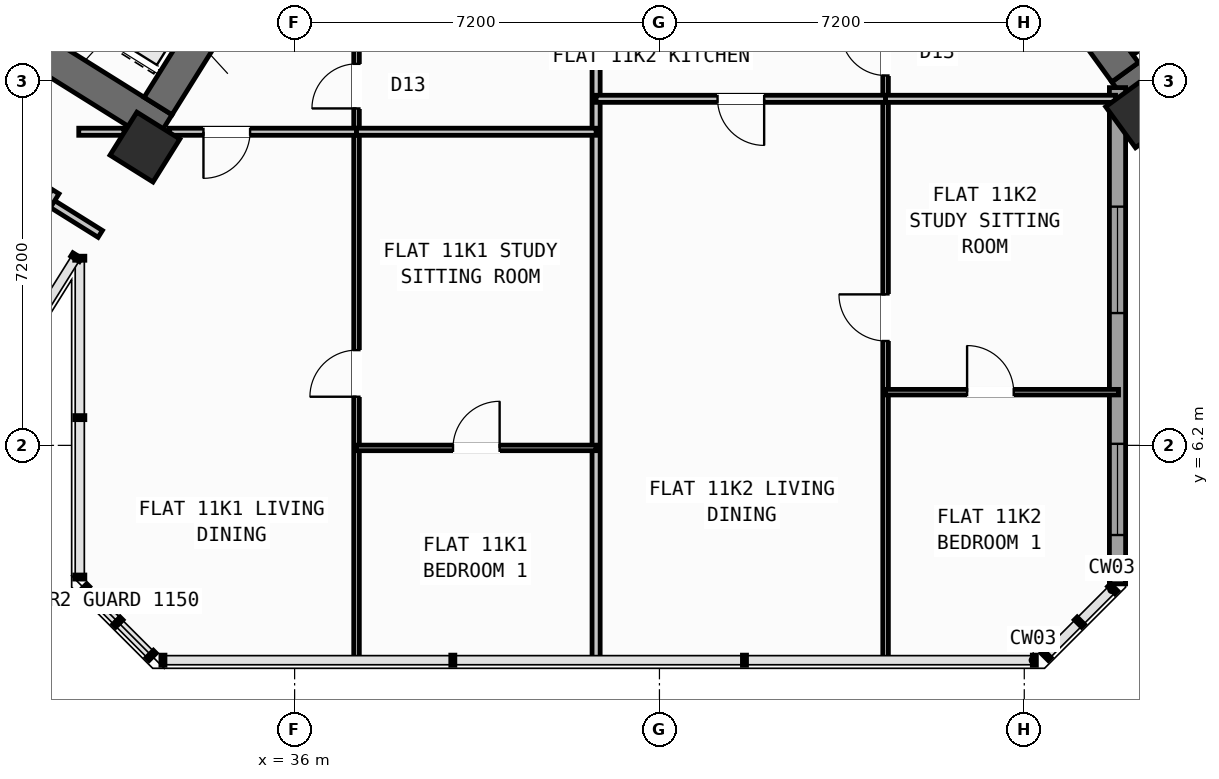
"""IFC4 building model, lengths in metres.
Left out: names, types, materials, properties, quantities, classifications, styles, units other than length and angle.
Written with IfcOpenShell. Run it as: python <this file> out.ifc"""

import sys

from ifc_helpers import new_model, si_unit, direction, frame, frame_2d, origin, origin_2d, place, context, subcontext, project, spatial, rectangle, hollow_rectangle, extrude, source, transform, mapped, element, fill, save


model = new_model("IFC4")
c1 = context("Model", 3, precision=1e-05, world=origin(), true_north=direction((0.0, 1.0)))
c2 = subcontext(c1, "Body", "Model", "MODEL_VIEW")
j1 = project(units=[si_unit("LENGTHUNIT", "METRE"), si_unit("PLANEANGLEUNIT", "RADIAN")], contexts=[c1])
p1 = place(None, origin())
s1 = spatial("IfcSite", under=j1, at=p1, CompositionType="ELEMENT")
p2 = place(p1, origin())
s2 = spatial("IfcBuilding", under=s1, at=p2, CompositionType="ELEMENT")
p3 = place(p2, frame((0.0, 0.0, 45.6)))
s3 = spatial("IfcBuildingStorey", under=s2, at=p3, CompositionType="ELEMENT", Elevation=45.6)
p4 = place(p3, frame((33.409, 12.45, 0.0), z_axis=(0.0, 0.0, 1.0), x_axis=(-0.848051132073, 0.529914405721, 0.0)))
e1 = element("IfcWall", 1, at=p4, inside=s3, PredefinedType="SHEAR", context=c2, shape_type="SweptSolid", body=[
    extrude(rectangle(XDim=13.24, YDim=0.65, at=frame_2d((6.62, 0.0))), origin(), (0.0, 0.0, 1.0), 3.35),
])
p5 = place(p3, frame((36.683, 18.304, 0.0), z_axis=(0.0, 0.0, 1.0), x_axis=(-0.529899109053, -0.848060690178, 0.0)))
e2 = element("IfcWall", 2, at=p5, inside=s3, PredefinedType="SHEAR", context=c2, shape_type="SweptSolid", body=[
    extrude(rectangle(XDim=6.375, YDim=0.65, at=frame_2d((3.188, 0.0))), origin(), (0.0, 0.0, 1.0), 3.35),
])
p6 = place(p3, frame((52.318, 13.11, 0.0), z_axis=(0.0, 0.0, 1.0), x_axis=(0.809019445368, 0.587781878776, 0.0)))
e3 = element("IfcWall", 3, at=p6, inside=s3, PredefinedType="SHEAR", context=c2, shape_type="SweptSolid", body=[
    extrude(rectangle(XDim=12.44, YDim=0.65, at=frame_2d((6.22, 0.0))), origin(), (0.0, 0.0, 1.0), 3.35),
])
p7 = place(p3, frame((52.39, 13.564, 0.0), z_axis=(0.0, 0.0, 1.0), x_axis=(-0.58779688989, 0.809008539037, 0.0)))
e4 = element("IfcWall", 4, at=p7, inside=s3, PredefinedType="SHEAR", context=c2, shape_type="SweptSolid", body=[
    extrude(rectangle(XDim=3.525, YDim=0.65, at=frame_2d((1.763, 0.0))), origin(), (0.0, 0.0, 1.0), 3.35),
])
m1 = source(origin(), c2, "Body", "SweptSolid", [
    extrude(hollow_rectangle(XDim=1.0, YDim=1.0, WallThickness=0.04, at=origin_2d()), origin(), (0.0, 0.0, 1.0), 3.6),
])
for number, where, z_axis, x_axis in (
    (5, (33.046, 12.087, 0.0), (0.0, 0.0, 1.0), (-0.848, 0.53, 0.0)),
    (6, (52.705, 12.773, 0.0), (0.0, 0.0, 1.0), (0.809, 0.588, 0.0)),
):
    element("IfcColumn", number, at=place(p3, frame(where, z_axis=z_axis, x_axis=x_axis)), inside=s3, PredefinedType="COLUMN", context=c2, shape_type="MappedRepresentation", body=[
        mapped(m1, transform((0.0, 0.0, 0.0), scale=1.0)),
    ])
p8 = place(p3, frame((56.581, 7.439, 0.0), z_axis=(0.0, 0.0, 1.0), x_axis=(-0.587785875463, 0.809016541614, 0.0)))
e7 = element("IfcWall", 7, at=p8, inside=s3, PredefinedType="STANDARD", context=c2, shape_type="SweptSolid", body=[
    extrude(rectangle(XDim=6.774, YDim=0.32, at=frame_2d((3.387, 0.0))), origin(), (0.0, 0.0, 1.0), 2.725),
])
p9 = place(p8, frame((1.556, 0.0, 0.8)))
e8 = element("IfcOpeningElement", 8, at=p9, cuts=e7, PredefinedType="OPENING", context=c2, shape_type="SweptSolid", body=[
    extrude(rectangle(XDim=2.1, YDim=1.55, at=frame_2d((1.05, 0.775))), frame((0.0, 0.17, 0.0), z_axis=(0.0, -1.0, 0.0), x_axis=(1.0, 0.0, 0.0)), (0.0, 0.0, 1.0), 0.34),
])
p10 = place(p3, frame((52.24, 13.261, 0.0), z_axis=(0.0, 0.0, 1.0), x_axis=(0.0, -1.0, 0.0)))
e9 = element("IfcWall", 9, at=p10, inside=s3, PredefinedType="STANDARD", context=c2, shape_type="SweptSolid", body=[
    extrude(rectangle(XDim=9.795, YDim=0.32, at=frame_2d((4.897, 0.0))), origin(), (0.0, 0.0, 1.0), 3.35),
])
p11 = place(p10, frame((2.349, 0.0, 0.8)))
e10 = element("IfcOpeningElement", 10, at=p11, cuts=e9, PredefinedType="OPENING", context=c2, shape_type="SweptSolid", body=[
    extrude(rectangle(XDim=2.1, YDim=1.55, at=frame_2d((1.05, 0.775))), frame((0.0, 0.17, 0.0), z_axis=(0.0, -1.0, 0.0), x_axis=(1.0, 0.0, 0.0)), (0.0, 0.0, 1.0), 0.34),
])
p12 = place(p10, frame((7.03, 0.0, 0.85)))
e11 = element("IfcOpeningElement", 11, at=p12, cuts=e9, PredefinedType="OPENING", context=c2, shape_type="SweptSolid", body=[
    extrude(rectangle(XDim=1.8, YDim=1.5, at=frame_2d((0.9, 0.75))), frame((0.0, 0.17, 0.0), z_axis=(0.0, -1.0, 0.0), x_axis=(1.0, 0.0, 0.0)), (0.0, 0.0, 1.0), 0.34),
])
p13 = place(p3, frame((52.472, 14.013, 0.0), z_axis=(0.0, 0.0, 1.0), x_axis=(0.809028366311, 0.587769599847, 0.0)))
e12 = element("IfcWall", 12, at=p13, inside=s3, PredefinedType="SHEAR", context=c2, shape_type="SweptSolid", body=[
    extrude(rectangle(XDim=7.33, YDim=0.26, at=frame_2d((3.665, 0.0))), origin(), (0.0, 0.0, 1.0), 3.35),
])
p14 = place(p3, frame((32.164, 10.374, 0.0), z_axis=(0.0, 0.0, 1.0), x_axis=(-0.848044107957, 0.529925646633, 0.0)))
e13 = element("IfcWall", 13, at=p14, inside=s3, PredefinedType="PARTITIONING", context=c2, shape_type="SweptSolid", body=[
    extrude(rectangle(XDim=15.57, YDim=0.16, at=frame_2d((7.785, 0.0))), origin(), (0.0, 0.0, 1.0), 3.34),
])
p15 = place(p14, frame((10.83, 0.0, 0.0)))
e14 = element("IfcOpeningElement", 14, at=p15, cuts=e13, PredefinedType="OPENING", context=c2, shape_type="SweptSolid", body=[
    extrude(rectangle(XDim=1.0, YDim=2.1, at=frame_2d((0.5, 1.05))), frame((0.0, 0.09, 0.0), z_axis=(0.0, -1.0, 0.0), x_axis=(1.0, 0.0, 0.0)), (0.0, 0.0, 1.0), 0.18),
])
p16 = place(p3, frame((31.282, 11.208, 0.0), z_axis=(0.0, 0.0, 1.0), x_axis=(-0.529938869374, -0.84803584519, 0.0)))
e15 = element("IfcWall", 15, at=p16, inside=s3, PredefinedType="PARTITIONING", context=c2, shape_type="SweptSolid", body=[
    extrude(rectangle(XDim=5.48, YDim=0.16, at=frame_2d((2.74, 0.0))), origin(), (0.0, 0.0, 1.0), 3.34),
])
p17 = place(p3, frame((41.95, 1.96, 0.0), z_axis=(0.0, 0.0, 1.0), x_axis=(0.0, 1.0, 0.0)))
e16 = element("IfcWall", 16, at=p17, inside=s3, PredefinedType="PARTITIONING", context=c2, shape_type="SweptSolid", body=[
    extrude(rectangle(XDim=13.46, YDim=0.16, at=frame_2d((6.73, 0.0))), origin(), (0.0, 0.0, 1.0), 3.34),
])
p18 = place(p3, frame((37.222, 1.96, 0.0), z_axis=(0.0, 0.0, 1.0), x_axis=(0.0, 1.0, 0.0)))
e17 = element("IfcWall", 17, at=p18, inside=s3, PredefinedType="PARTITIONING", context=c2, shape_type="SweptSolid", body=[
    extrude(rectangle(XDim=13.46, YDim=0.11, at=frame_2d((6.73, 0.0))), origin(), (0.0, 0.0, 1.0), 3.34),
])
p19 = place(p18, frame((5.2, 0.0, 0.0)))
e18 = element("IfcOpeningElement", 18, at=p19, cuts=e17, PredefinedType="OPENING", context=c2, shape_type="SweptSolid", body=[
    extrude(rectangle(XDim=0.92, YDim=2.08, at=frame_2d((0.46, 1.04))), frame((0.0, 0.065, 0.0), z_axis=(0.0, -1.0, 0.0), x_axis=(1.0, 0.0, 0.0)), (0.0, 0.0, 1.0), 0.13),
])
p20 = place(p18, frame((10.89, 0.0, 0.0)))
e19 = element("IfcOpeningElement", 19, at=p20, cuts=e17, PredefinedType="OPENING", context=c2, shape_type="SweptSolid", body=[
    extrude(rectangle(XDim=0.88, YDim=2.08, at=frame_2d((0.44, 1.04))), frame((0.0, 0.065, 0.0), z_axis=(0.0, -1.0, 0.0), x_axis=(1.0, 0.0, 0.0)), (0.0, 0.0, 1.0), 0.13),
])
p21 = place(p3, frame((31.74, 12.39, 0.0), z_axis=(0.0, 0.0, 1.0), x_axis=(1.0, 0.0, 0.0)))
e20 = element("IfcWall", 20, at=p21, inside=s3, PredefinedType="PLUMBINGWALL", context=c2, shape_type="SweptSolid", body=[
    extrude(rectangle(XDim=0.892, YDim=0.14, at=frame_2d((0.446, 0.0))), origin(), (0.0, 0.0, 1.0), 3.34),
])
p22 = place(p3, frame((33.527, 12.39, 0.0), z_axis=(0.0, 0.0, 1.0), x_axis=(1.0, 0.0, 0.0)))
e21 = element("IfcWall", 21, at=p22, inside=s3, PredefinedType="PLUMBINGWALL", context=c2, shape_type="SweptSolid", body=[
    extrude(rectangle(XDim=3.695, YDim=0.14, at=frame_2d((1.847, 0.0))), origin(), (0.0, 0.0, 1.0), 2.525),
])
p23 = place(p22, frame((0.674, 0.0, 0.0)))
e22 = element("IfcOpeningElement", 22, at=p23, cuts=e21, PredefinedType="OPENING", context=c2, shape_type="SweptSolid", body=[
    extrude(rectangle(XDim=0.92, YDim=2.08, at=frame_2d((0.46, 1.04))), frame((0.0, 0.08, 0.0), z_axis=(0.0, -1.0, 0.0), x_axis=(1.0, 0.0, 0.0)), (0.0, 0.0, 1.0), 0.16),
])
p24 = place(p3, frame((37.222, 12.39, 0.0), z_axis=(0.0, 0.0, 1.0), x_axis=(1.0, 0.0, 0.0)))
e23 = element("IfcWall", 23, at=p24, inside=s3, PredefinedType="PLUMBINGWALL", context=c2, shape_type="SweptSolid", body=[
    extrude(rectangle(XDim=4.728, YDim=0.14, at=frame_2d((2.364, 0.0))), origin(), (0.0, 0.0, 1.0), 2.525),
])
p25 = place(p3, frame((37.222, 6.15, 0.0), z_axis=(0.0, 0.0, 1.0), x_axis=(1.0, 0.0, 0.0)))
e24 = element("IfcWall", 24, at=p25, inside=s3, PredefinedType="PARTITIONING", context=c2, shape_type="SweptSolid", body=[
    extrude(rectangle(XDim=4.728, YDim=0.11, at=frame_2d((2.364, 0.0))), origin(), (0.0, 0.0, 1.0), 3.34),
])
p26 = place(p25, frame((1.904, 0.0, 0.0)))
e25 = element("IfcOpeningElement", 25, at=p26, cuts=e24, PredefinedType="OPENING", context=c2, shape_type="SweptSolid", body=[
    extrude(rectangle(XDim=0.92, YDim=2.08, at=frame_2d((0.46, 1.04))), frame((0.0, 0.065, 0.0), z_axis=(0.0, -1.0, 0.0), x_axis=(1.0, 0.0, 0.0)), (0.0, 0.0, 1.0), 0.13),
])
p27 = place(p3, frame((47.663, 1.96, 0.0), z_axis=(0.0, 0.0, 1.0), x_axis=(0.0, 1.0, 0.0)))
e26 = element("IfcWall", 26, at=p27, inside=s3, PredefinedType="PARTITIONING", context=c2, shape_type="SweptSolid", body=[
    extrude(rectangle(XDim=13.46, YDim=0.11, at=frame_2d((6.73, 0.0))), origin(), (0.0, 0.0, 1.0), 3.34),
])
p28 = place(p27, frame((6.3, 0.0, 0.0)))
e27 = element("IfcOpeningElement", 27, at=p28, cuts=e26, PredefinedType="OPENING", context=c2, shape_type="SweptSolid", body=[
    extrude(rectangle(XDim=0.92, YDim=2.08, at=frame_2d((0.46, 1.04))), frame((0.0, 0.065, 0.0), z_axis=(0.0, -1.0, 0.0), x_axis=(1.0, 0.0, 0.0)), (0.0, 0.0, 1.0), 0.13),
])
p29 = place(p27, frame((11.54, 0.0, 0.0)))
e28 = element("IfcOpeningElement", 28, at=p29, cuts=e26, PredefinedType="OPENING", context=c2, shape_type="SweptSolid", body=[
    extrude(rectangle(XDim=0.88, YDim=2.08, at=frame_2d((0.44, 1.04))), frame((0.0, 0.065, 0.0), z_axis=(0.0, -1.0, 0.0), x_axis=(1.0, 0.0, 0.0)), (0.0, 0.0, 1.0), 0.13),
])
p30 = place(p3, frame((41.95, 13.04, 0.0), z_axis=(0.0, 0.0, 1.0), x_axis=(1.0, 0.0, 0.0)))
e29 = element("IfcWall", 29, at=p30, inside=s3, PredefinedType="PLUMBINGWALL", context=c2, shape_type="SweptSolid", body=[
    extrude(rectangle(XDim=5.713, YDim=0.14, at=frame_2d((2.856, 0.0))), origin(), (0.0, 0.0, 1.0), 3.34),
])
p31 = place(p30, frame((2.396, 0.0, 0.0)))
e30 = element("IfcOpeningElement", 30, at=p31, cuts=e29, PredefinedType="OPENING", context=c2, shape_type="SweptSolid", body=[
    extrude(rectangle(XDim=0.92, YDim=2.08, at=frame_2d((0.46, 1.04))), frame((0.0, 0.08, 0.0), z_axis=(0.0, -1.0, 0.0), x_axis=(1.0, 0.0, 0.0)), (0.0, 0.0, 1.0), 0.16),
])
p32 = place(p3, frame((47.663, 13.04, 0.0), z_axis=(0.0, 0.0, 1.0), x_axis=(1.0, 0.0, 0.0)))
e31 = element("IfcWall", 31, at=p32, inside=s3, PredefinedType="PLUMBINGWALL", context=c2, shape_type="SweptSolid", body=[
    extrude(rectangle(XDim=4.538, YDim=0.14, at=frame_2d((2.269, 0.0))), origin(), (0.0, 0.0, 1.0), 2.525),
])
p33 = place(p3, frame((47.663, 7.25, 0.0), z_axis=(0.0, 0.0, 1.0), x_axis=(1.0, 0.0, 0.0)))
e32 = element("IfcWall", 32, at=p33, inside=s3, PredefinedType="PARTITIONING", context=c2, shape_type="SweptSolid", body=[
    extrude(rectangle(XDim=4.597, YDim=0.11, at=frame_2d((2.298, 0.0))), origin(), (0.0, 0.0, 1.0), 3.34),
])
p34 = place(p33, frame((1.608, 0.0, 0.0)))
e33 = element("IfcOpeningElement", 33, at=p34, cuts=e32, PredefinedType="OPENING", context=c2, shape_type="SweptSolid", body=[
    extrude(rectangle(XDim=0.92, YDim=2.08, at=frame_2d((0.46, 1.04))), frame((0.0, 0.065, 0.0), z_axis=(0.0, -1.0, 0.0), x_axis=(1.0, 0.0, 0.0)), (0.0, 0.0, 1.0), 0.13),
])
m2 = source(origin(), c2, "Body", "SweptSolid", [
    extrude(rectangle(XDim=2.1, YDim=1.55, at=frame_2d((1.05, 0.775))), frame((0.0, 0.03, 0.0), z_axis=(0.0, -1.0, 0.0), x_axis=(1.0, 0.0, 0.0)), (0.0, 0.0, 1.0), 0.06),
])
p35 = place(p11, origin())
e34 = element("IfcWindow", 34, at=p35, inside=s3, PartitioningType="SINGLE_PANEL", PredefinedType="WINDOW", context=c2, shape_type="MappedRepresentation", body=[
    mapped(m2, transform((0.0, 0.0, 0.0), scale=1.0)),
])
fill(e10, e34)
m3 = source(origin(), c2, "Body", "SweptSolid", [
    extrude(rectangle(XDim=1.8, YDim=1.5, at=frame_2d((0.9, 0.75))), frame((0.0, 0.03, 0.0), z_axis=(0.0, -1.0, 0.0), x_axis=(1.0, 0.0, 0.0)), (0.0, 0.0, 1.0), 0.06),
])
p36 = place(p12, origin())
e35 = element("IfcWindow", 35, at=p36, inside=s3, PartitioningType="SINGLE_PANEL", PredefinedType="WINDOW", context=c2, shape_type="MappedRepresentation", body=[
    mapped(m3, transform((0.0, 0.0, 0.0), scale=1.0)),
])
fill(e11, e35)
m4 = source(origin(), c2, "Body", "SweptSolid", [
    extrude(rectangle(XDim=0.92, YDim=2.08, at=frame_2d((0.46, 1.04))), frame((0.0, 0.025, 0.0), z_axis=(0.0, -1.0, 0.0), x_axis=(1.0, 0.0, 0.0)), (0.0, 0.0, 1.0), 0.05),
])
p37 = place(p19, origin())
e36 = element("IfcDoor", 36, at=p37, inside=s3, OperationType="SINGLE_SWING_LEFT", PredefinedType="DOOR", context=c2, shape_type="MappedRepresentation", body=[
    mapped(m4, transform((0.0, 0.0, 0.0), scale=1.0)),
])
fill(e18, e36)
p38 = place(p26, origin())
e37 = element("IfcDoor", 37, at=p38, inside=s3, OperationType="SINGLE_SWING_RIGHT", PredefinedType="DOOR", context=c2, shape_type="MappedRepresentation", body=[
    mapped(m4, transform((0.0, 0.0, 0.0), scale=1.0)),
])
fill(e25, e37)
p39 = place(p23, frame((0.92, 0.0, 0.0), z_axis=(0.0, 0.0, 1.0), x_axis=(-1.0, 0.0, 0.0)))
e38 = element("IfcDoor", 38, at=p39, inside=s3, OperationType="SINGLE_SWING_RIGHT", PredefinedType="DOOR", context=c2, shape_type="MappedRepresentation", body=[
    mapped(m4, transform((0.0, 0.0, 0.0), scale=1.0)),
])
fill(e22, e38)
m5 = source(origin(), c2, "Body", "SweptSolid", [
    extrude(rectangle(XDim=0.88, YDim=2.08, at=frame_2d((0.44, 1.04))), frame((0.0, 0.025, 0.0), z_axis=(0.0, -1.0, 0.0), x_axis=(1.0, 0.0, 0.0)), (0.0, 0.0, 1.0), 0.05),
])
p40 = place(p20, origin())
e39 = element("IfcDoor", 39, at=p40, inside=s3, OperationType="SINGLE_SWING_LEFT", PredefinedType="DOOR", context=c2, shape_type="MappedRepresentation", body=[
    mapped(m5, transform((0.0, 0.0, 0.0), scale=1.0)),
])
fill(e19, e39)
p41 = place(p28, origin())
e40 = element("IfcDoor", 40, at=p41, inside=s3, OperationType="SINGLE_SWING_RIGHT", PredefinedType="DOOR", context=c2, shape_type="MappedRepresentation", body=[
    mapped(m4, transform((0.0, 0.0, 0.0), scale=1.0)),
])
fill(e27, e40)
p42 = place(p34, origin())
e41 = element("IfcDoor", 41, at=p42, inside=s3, OperationType="SINGLE_SWING_LEFT", PredefinedType="DOOR", context=c2, shape_type="MappedRepresentation", body=[
    mapped(m4, transform((0.0, 0.0, 0.0), scale=1.0)),
])
fill(e33, e41)
p43 = place(p31, frame((0.92, 0.0, 0.0), z_axis=(0.0, 0.0, 1.0), x_axis=(-1.0, 0.0, 0.0)))
e42 = element("IfcDoor", 42, at=p43, inside=s3, OperationType="SINGLE_SWING_LEFT", PredefinedType="DOOR", context=c2, shape_type="MappedRepresentation", body=[
    mapped(m4, transform((0.0, 0.0, 0.0), scale=1.0)),
])
fill(e30, e42)
p44 = place(p29, origin())
e43 = element("IfcDoor", 43, at=p44, inside=s3, OperationType="SINGLE_SWING_RIGHT", PredefinedType="DOOR", context=c2, shape_type="MappedRepresentation", body=[
    mapped(m5, transform((0.0, 0.0, 0.0), scale=1.0)),
])
fill(e28, e43)
save(model, sys.argv[1])
